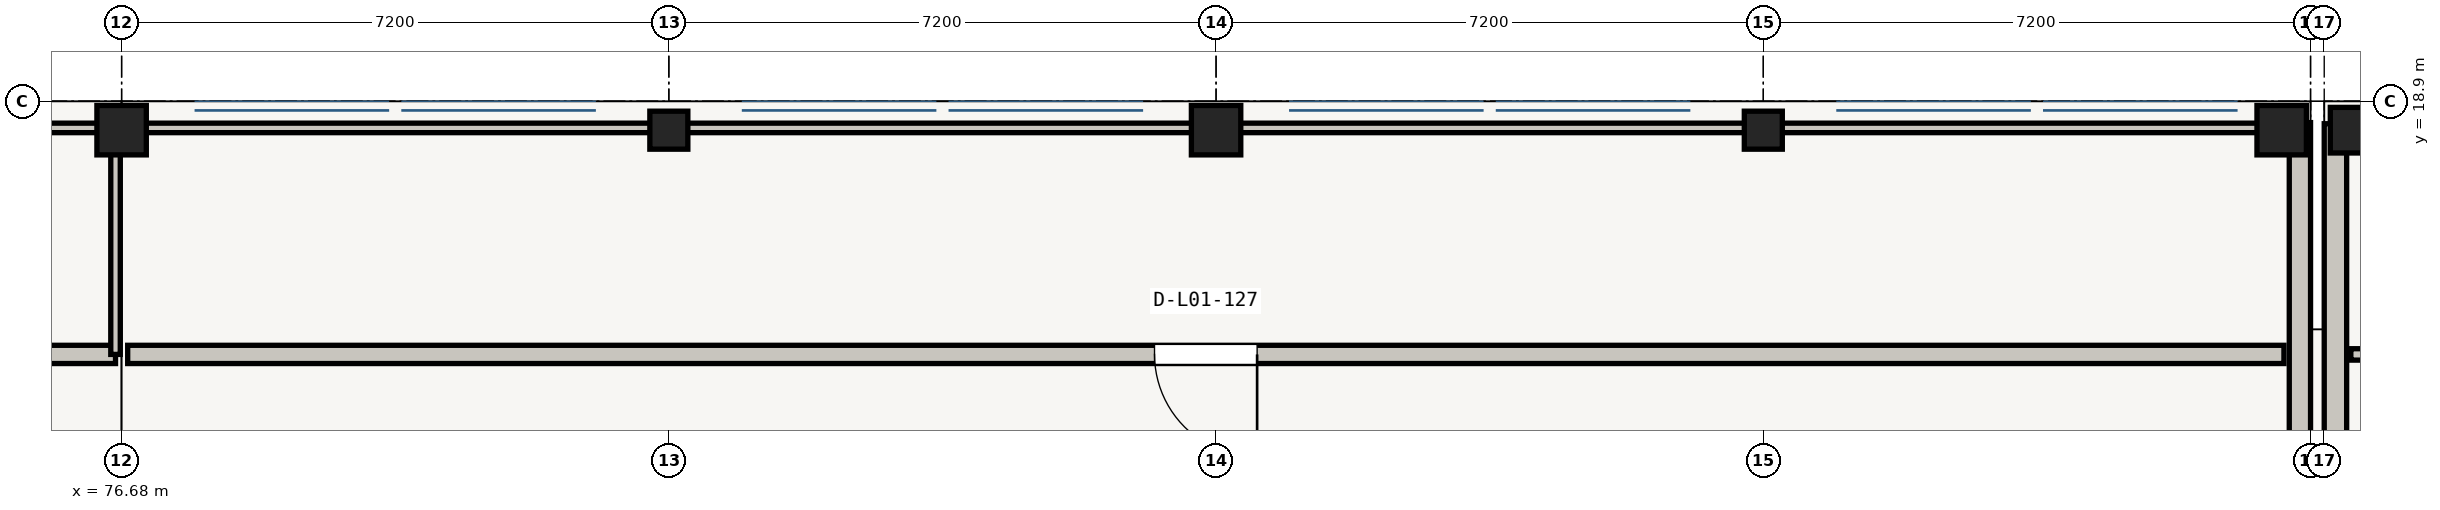
"""IFC4 building model, lengths in metres.
Left out: names, types, materials, properties, quantities, classifications, styles, units other than length and angle.
Written with IfcOpenShell. Run it as: python <this file> out.ifc"""

import sys

from ifc_helpers import new_model, si_unit, direction, frame, frame_2d, origin, origin_2d, place, context, subcontext, project, spatial, rectangle, extrude, element, fill, save


model = new_model("IFC4")
c1 = context("Model", 3, precision=1e-05, world=origin(), true_north=direction((0.0, 1.0)))
c2 = subcontext(c1, "Body", "Model", "MODEL_VIEW")
j1 = project(units=[si_unit("LENGTHUNIT", "METRE"), si_unit("PLANEANGLEUNIT", "RADIAN")], contexts=[c1])
p1 = place(None, origin())
s1 = spatial("IfcSite", under=j1, at=p1, CompositionType="ELEMENT")
p2 = place(p1, origin())
s2 = spatial("IfcBuilding", under=s1, at=p2, CompositionType="ELEMENT")
p3 = place(p2, frame((0.0, 0.0, 4.5)))
s3 = spatial("IfcBuildingStorey", under=s2, at=p3, CompositionType="ELEMENT", Elevation=4.5)
p4 = place(p3, frame((76.68, 18.52, 0.0), z_axis=(0.0, 0.0, 1.0), x_axis=(1.0, 0.0, 0.0)))
e1 = element("IfcColumn", 1, at=p4, inside=s3, PredefinedType="COLUMN", context=c2, shape_type="SweptSolid", body=[
    extrude(rectangle(XDim=0.65, YDim=0.65, at=origin_2d()), origin(), (0.0, 0.0, 1.0), 3.96),
])
p5 = place(p3, frame((83.88, 18.52, 0.0), z_axis=(0.0, 0.0, 1.0), x_axis=(1.0, 0.0, 0.0)))
e2 = element("IfcColumn", 2, at=p5, inside=s3, PredefinedType="COLUMN", context=c2, shape_type="SweptSolid", body=[
    extrude(rectangle(XDim=0.5, YDim=0.5, at=origin_2d()), origin(), (0.0, 0.0, 1.0), 3.96),
])
p6 = place(p3, frame((91.08, 18.52, 0.0), z_axis=(0.0, 0.0, 1.0), x_axis=(1.0, 0.0, 0.0)))
e3 = element("IfcColumn", 3, at=p6, inside=s3, PredefinedType="COLUMN", context=c2, shape_type="SweptSolid", body=[
    extrude(rectangle(XDim=0.65, YDim=0.65, at=origin_2d()), origin(), (0.0, 0.0, 1.0), 3.96),
])
p7 = place(p3, frame((98.28, 18.52, 0.0), z_axis=(0.0, 0.0, 1.0), x_axis=(1.0, 0.0, 0.0)))
e4 = element("IfcColumn", 4, at=p7, inside=s3, PredefinedType="COLUMN", context=c2, shape_type="SweptSolid", body=[
    extrude(rectangle(XDim=0.5, YDim=0.5, at=origin_2d()), origin(), (0.0, 0.0, 1.0), 3.96),
])
p8 = place(p3, frame((105.1, 18.52, 0.0), z_axis=(0.0, 0.0, 1.0), x_axis=(1.0, 0.0, 0.0)))
e5 = element("IfcColumn", 5, at=p8, inside=s3, PredefinedType="COLUMN", context=c2, shape_type="SweptSolid", body=[
    extrude(rectangle(XDim=0.65, YDim=0.65, at=origin_2d()), origin(), (0.0, 0.0, 1.0), 3.96),
])
p9 = place(p3, frame((106.04, 18.52, 0.0), z_axis=(0.0, 0.0, 1.0), x_axis=(1.0, 0.0, 0.0)))
e6 = element("IfcColumn", 6, at=p9, inside=s3, PredefinedType="COLUMN", context=c2, shape_type="SweptSolid", body=[
    extrude(rectangle(XDim=0.6, YDim=0.6, at=origin_2d()), origin(), (0.0, 0.0, 1.0), 3.905),
])
p10 = place(p3, frame((105.34, 18.62, 0.0), z_axis=(0.0, 0.0, 1.0), x_axis=(0.0, -1.0, 0.0)))
e7 = element("IfcWall", 7, at=p10, inside=s3, PredefinedType="STANDARD", context=c2, shape_type="SweptSolid", body=[
    extrude(rectangle(XDim=6.92, YDim=0.28, at=frame_2d((3.46, 0.0))), origin(), (0.0, 0.0, 1.0), 3.995),
])
p11 = place(p3, frame((105.808, 11.7, 0.0), z_axis=(0.0, 0.0, 1.0), x_axis=(0.0, 1.0, 0.0)))
e8 = element("IfcWall", 8, at=p11, inside=s3, PredefinedType="STANDARD", context=c2, shape_type="SweptSolid", body=[
    extrude(rectangle(XDim=6.905, YDim=0.295, at=frame_2d((3.453, 0.0))), origin(), (0.0, 0.0, 1.0), 3.29),
])
p12 = place(p3, frame((76.6, 15.57, 0.0), z_axis=(0.0, 0.0, 1.0), x_axis=(-1.0, 0.0, 0.0)))
e9 = element("IfcWall", 9, at=p12, inside=s3, PredefinedType="SOLIDWALL", context=c2, shape_type="SweptSolid", body=[
    extrude(rectangle(XDim=28.37, YDim=0.24, at=frame_2d((14.185, 0.0))), origin(), (0.0, 0.0, 1.0), 2.905),
])
p13 = place(p12, frame((13.51, 0.0, 0.0)))
e10 = element("IfcOpeningElement", 10, at=p13, cuts=e9, PredefinedType="OPENING", context=c2, shape_type="SweptSolid", body=[
    extrude(rectangle(XDim=1.35, YDim=2.1, at=frame_2d((0.675, 1.05))), frame((0.0, 0.12, 0.0), z_axis=(0.0, -1.0, 0.0), x_axis=(1.0, 0.0, 0.0)), (0.0, 0.0, 1.0), 0.24),
])
p14 = place(p3, frame((76.6, 18.55, 0.0), z_axis=(0.0, 0.0, 1.0), x_axis=(0.0, -1.0, 0.0)))
e11 = element("IfcWall", 11, at=p14, inside=s3, PredefinedType="PARTITIONING", context=c2, shape_type="SweptSolid", body=[
    extrude(rectangle(XDim=2.98, YDim=0.125, at=frame_2d((1.49, 0.0))), origin(), (0.0, 0.0, 1.0), 2.905),
])
p15 = place(p3, frame((48.23, 18.55, 0.0), z_axis=(0.0, 0.0, 1.0), x_axis=(1.0, 0.0, 0.0)))
e12 = element("IfcWall", 12, at=p15, inside=s3, PredefinedType="PARTITIONING", context=c2, shape_type="SweptSolid", body=[
    extrude(rectangle(XDim=28.37, YDim=0.125, at=frame_2d((14.185, 0.0))), origin(), (0.0, 0.0, 1.0), 2.905),
])
p16 = place(p3, frame((105.13, 15.57, 0.0), z_axis=(0.0, 0.0, 1.0), x_axis=(-1.0, 0.0, 0.0)))
e13 = element("IfcWall", 13, at=p16, inside=s3, PredefinedType="SOLIDWALL", context=c2, shape_type="SweptSolid", body=[
    extrude(rectangle(XDim=28.37, YDim=0.24, at=frame_2d((14.185, 0.0))), origin(), (0.0, 0.0, 1.0), 2.905),
])
p17 = place(p16, frame((13.51, 0.0, 0.0)))
e14 = element("IfcOpeningElement", 14, at=p17, cuts=e13, PredefinedType="OPENING", context=c2, shape_type="SweptSolid", body=[
    extrude(rectangle(XDim=1.35, YDim=2.1, at=frame_2d((0.675, 1.05))), frame((0.0, 0.12, 0.0), z_axis=(0.0, -1.0, 0.0), x_axis=(1.0, 0.0, 0.0)), (0.0, 0.0, 1.0), 0.24),
])
p18 = place(p3, frame((76.76, 18.55, 0.0), z_axis=(0.0, 0.0, 1.0), x_axis=(1.0, 0.0, 0.0)))
e15 = element("IfcWall", 15, at=p18, inside=s3, PredefinedType="PARTITIONING", context=c2, shape_type="SweptSolid", body=[
    extrude(rectangle(XDim=28.37, YDim=0.125, at=frame_2d((14.185, 0.0))), origin(), (0.0, 0.0, 1.0), 2.905),
])
p19 = place(p3, frame((135.4, 15.57, 0.0), z_axis=(0.0, 0.0, 1.0), x_axis=(-1.0, 0.0, 0.0)))
e16 = element("IfcWall", 16, at=p19, inside=s3, PredefinedType="PARTITIONING", context=c2, shape_type="SweptSolid", body=[
    extrude(rectangle(XDim=29.39, YDim=0.15, at=frame_2d((14.695, 0.0))), origin(), (0.0, 0.0, 1.0), 2.925),
])
p20 = place(p19, frame((14.175, 0.0, 0.0)))
e17 = element("IfcOpeningElement", 17, at=p20, cuts=e16, PredefinedType="OPENING", context=c2, shape_type="SweptSolid", body=[
    extrude(rectangle(XDim=1.04, YDim=2.05, at=frame_2d((0.52, 1.025))), frame((0.0, 0.075, 0.0), z_axis=(0.0, -1.0, 0.0), x_axis=(1.0, 0.0, 0.0)), (0.0, 0.0, 1.0), 0.15),
])
p21 = place(p3, frame((106.01, 18.55, 0.0), z_axis=(0.0, 0.0, 1.0), x_axis=(1.0, 0.0, 0.0)))
e18 = element("IfcWall", 18, at=p21, inside=s3, PredefinedType="PARTITIONING", context=c2, shape_type="SweptSolid", body=[
    extrude(rectangle(XDim=29.39, YDim=0.125, at=frame_2d((14.695, 0.0))), origin(), (0.0, 0.0, 1.0), 2.925),
])
p22 = place(p17, origin())
e19 = element("IfcDoor", 19, at=p22, inside=s3, OperationType="SINGLE_SWING_LEFT", PredefinedType="DOOR", context=c2, shape_type="SweptSolid", body=[
    extrude(rectangle(XDim=1.35, YDim=2.1, at=frame_2d((0.675, 1.05))), frame((0.0, 0.025, 0.0), z_axis=(0.0, -1.0, 0.0), x_axis=(1.0, 0.0, 0.0)), (0.0, 0.0, 1.0), 0.05),
])
fill(e14, e19)
save(model, sys.argv[1])
